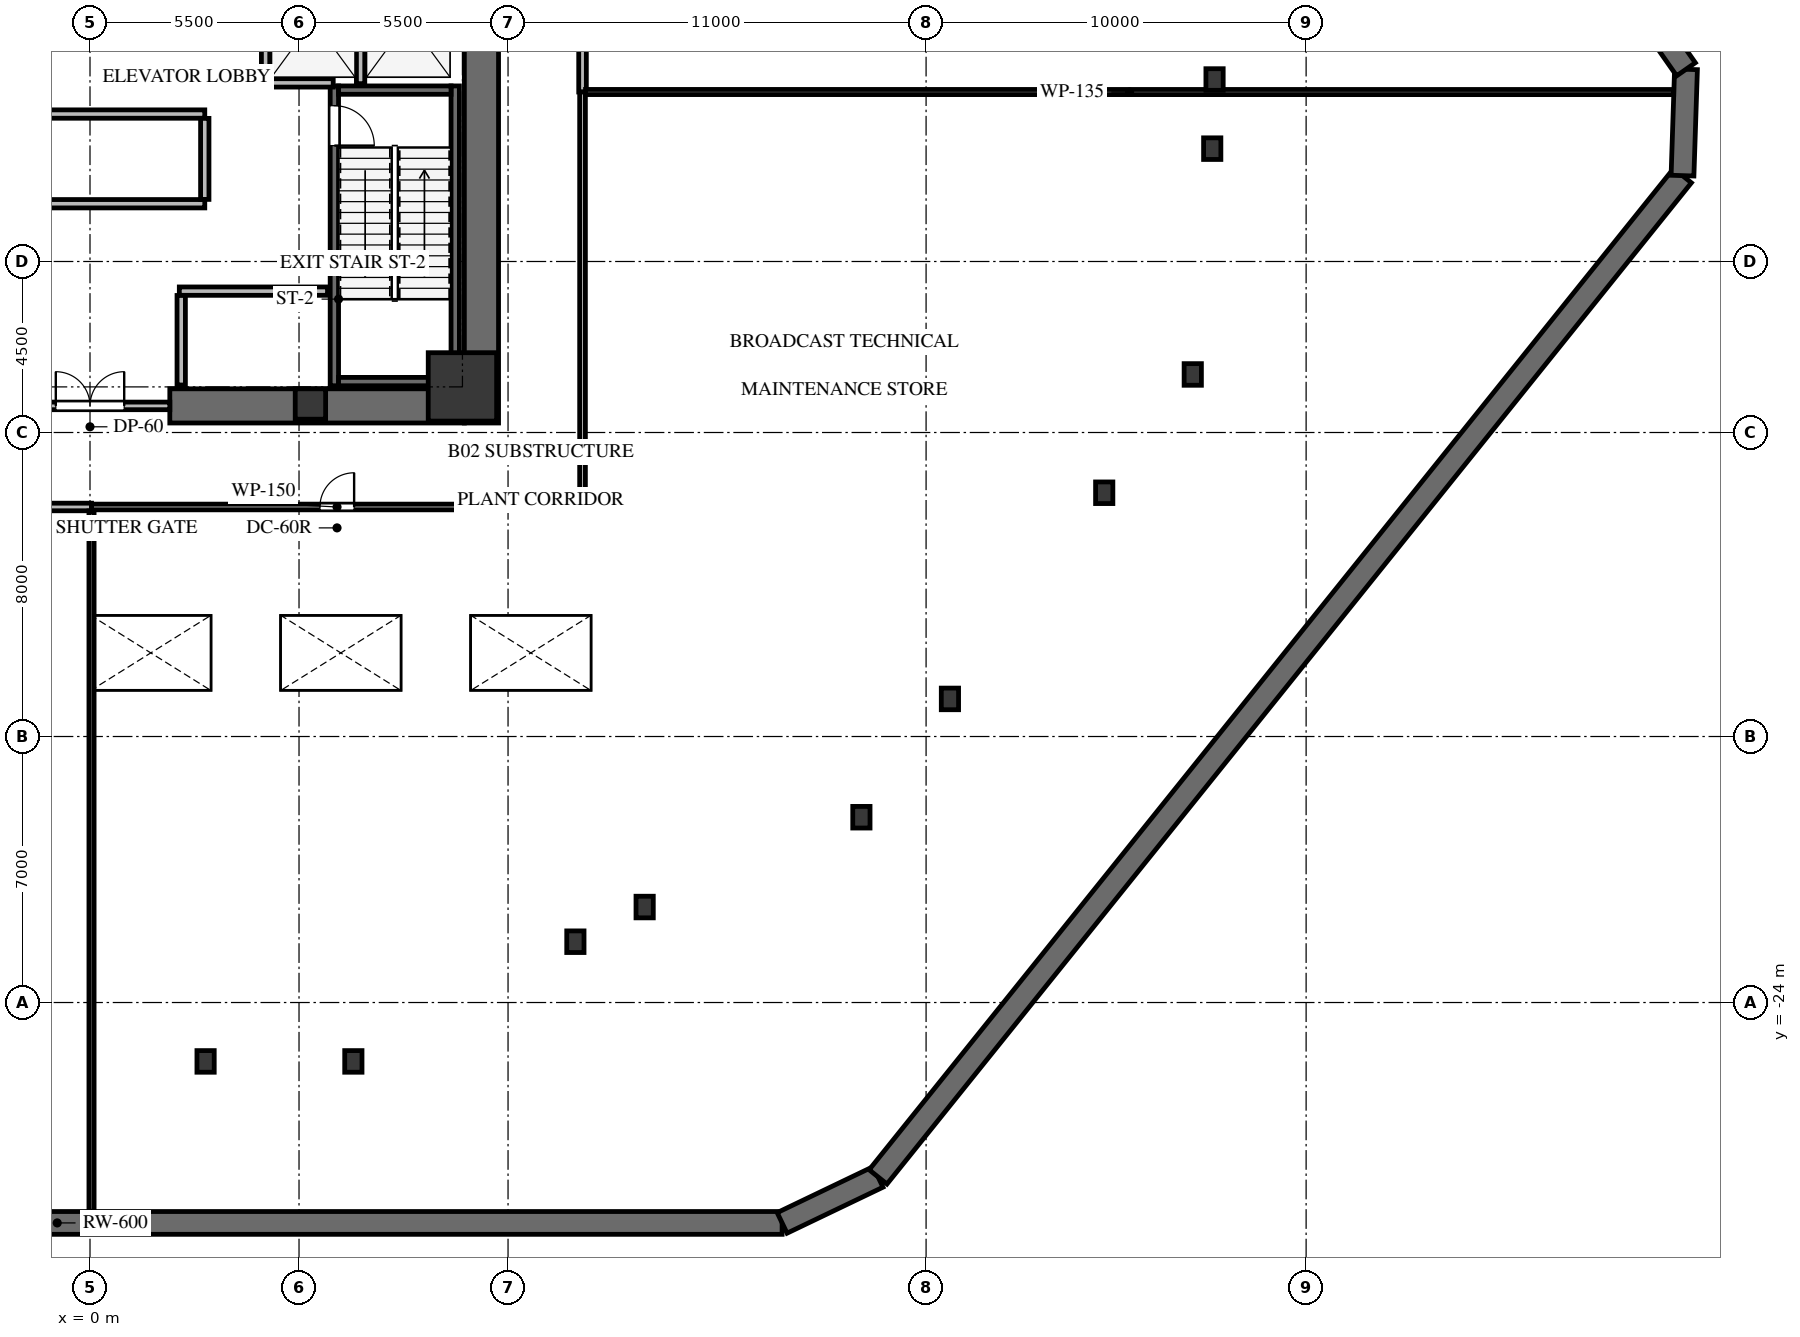
"""IFC4 building model, lengths in metres.
Left out: names, types, materials, properties, quantities, classifications, styles, units other than length and angle.
Written with IfcOpenShell. Run it as: python <this file> out.ifc"""

import sys

from ifc_helpers import new_model, si_unit, direction, frame, frame_2d, origin, origin_2d, place, context, subcontext, project, spatial, rectangle, i_section, extrude, source, transform, mapped, element, fill, save


model = new_model("IFC4")
c1 = context("Model", 3, precision=1e-05, world=origin(), true_north=direction((0.0, 1.0)))
c2 = subcontext(c1, "Body", "Model", "MODEL_VIEW")
j1 = project(units=[si_unit("LENGTHUNIT", "METRE"), si_unit("PLANEANGLEUNIT", "RADIAN")], contexts=[c1])
p1 = place(None, origin())
s1 = spatial("IfcSite", under=j1, at=p1, CompositionType="ELEMENT")
p2 = place(p1, origin())
s2 = spatial("IfcBuilding", under=s1, at=p2, CompositionType="ELEMENT")
p3 = place(p2, frame((0.0, 0.0, -10.0)))
s3 = spatial("IfcBuildingStorey", under=s2, at=p3, CompositionType="ELEMENT", Elevation=-10.0)
p4 = place(p3, frame((-19.938, -29.8, 0.0), z_axis=(0.0, 0.0, 1.0), x_axis=(1.0, 0.0, 0.0)))
e1 = element("IfcWall", 1, at=p4, inside=s3, PredefinedType="USERDEFINED", context=c2, shape_type="SweptSolid", body=[
    extrude(rectangle(XDim=38.149, YDim=0.6, at=frame_2d((19.075, 0.0))), origin(), (0.0, 0.0, 1.0), 5.0),
])
p5 = place(p3, frame((18.212, -29.8, 0.0), z_axis=(0.0, 0.0, 1.0), x_axis=(0.901732483037, 0.432294493415, 0.0)))
e2 = element("IfcWall", 2, at=p5, inside=s3, PredefinedType="USERDEFINED", context=c2, shape_type="SweptSolid", body=[
    extrude(rectangle(XDim=2.8, YDim=0.6, at=frame_2d((1.4, 0.0))), origin(), (0.0, 0.0, 1.0), 5.0),
])
p6 = place(p3, frame((20.737, -28.59, 0.0), z_axis=(0.0, 0.0, 1.0), x_axis=(0.626280274315, 0.779597984864, 0.0)))
e3 = element("IfcWall", 3, at=p6, inside=s3, PredefinedType="USERDEFINED", context=c2, shape_type="SweptSolid", body=[
    extrude(rectangle(XDim=33.798, YDim=0.6, at=frame_2d((16.899, 0.0))), origin(), (0.0, 0.0, 1.0), 5.0),
])
p7 = place(p3, frame((41.904, -2.24, 0.0), z_axis=(0.0, 0.0, 1.0), x_axis=(0.032870651185, 0.999459614137, 0.0)))
e4 = element("IfcWall", 4, at=p7, inside=s3, PredefinedType="USERDEFINED", context=c2, shape_type="SweptSolid", body=[
    extrude(rectangle(XDim=2.8, YDim=0.6, at=frame_2d((1.4, 0.0))), origin(), (0.0, 0.0, 1.0), 5.0),
])
p8 = place(p3, frame((41.996, 0.558, 0.0), z_axis=(0.0, 0.0, 1.0), x_axis=(-0.573667370151, 0.819088364234, 0.0)))
e5 = element("IfcWall", 5, at=p8, inside=s3, PredefinedType="USERDEFINED", context=c2, shape_type="SweptSolid", body=[
    extrude(rectangle(XDim=34.122, YDim=0.6, at=frame_2d((17.061, 0.0))), origin(), (0.0, 0.0, 1.0), 5.0),
])
p9 = place(p3, frame((10.3, -8.75, 0.0), z_axis=(0.0, 0.0, 1.0), x_axis=(0.0, 1.0, 0.0)))
e6 = element("IfcWall", 6, at=p9, inside=s3, PredefinedType="SHEAR", context=c2, shape_type="SweptSolid", body=[
    extrude(rectangle(XDim=17.5, YDim=0.9, at=frame_2d((8.75, 0.0))), origin(), (0.0, 0.0, 1.0), 5.0),
])
p10 = place(p3, frame((2.1, -8.3, 0.0), z_axis=(0.0, 0.0, 1.0), x_axis=(1.0, 0.0, 0.0)))
e7 = element("IfcWall", 7, at=p10, inside=s3, PredefinedType="SHEAR", context=c2, shape_type="SweptSolid", body=[
    extrude(rectangle(XDim=7.75, YDim=0.9, at=frame_2d((3.875, 0.0))), origin(), (0.0, 0.0, 1.0), 5.0),
])
p11 = place(p3, frame((9.61, -7.77, 0.0), z_axis=(0.0, 0.0, 1.0), x_axis=(0.0, 1.0, 0.0)))
e8 = element("IfcWall", 8, at=p11, inside=s3, PredefinedType="SHEAR", context=c2, shape_type="SweptSolid", body=[
    extrude(rectangle(XDim=7.89, YDim=0.22, at=frame_2d((3.945, 0.0))), origin(), (0.0, 0.0, 1.0), 4.65),
])
p12 = place(p3, frame((6.43, 0.12, 0.0), z_axis=(0.0, 0.0, 1.0), x_axis=(0.0, -1.0, 0.0)))
e9 = element("IfcWall", 9, at=p12, inside=s3, PredefinedType="SHEAR", context=c2, shape_type="SweptSolid", body=[
    extrude(rectangle(XDim=7.89, YDim=0.22, at=frame_2d((3.945, 0.0))), origin(), (0.0, 0.0, 1.0), 4.65),
])
p13 = place(p12, frame((0.52, 0.0, 0.0)))
e10 = element("IfcOpeningElement", 10, at=p13, cuts=e9, PredefinedType="OPENING", context=c2, shape_type="SweptSolid", body=[
    extrude(rectangle(XDim=1.05, YDim=2.15, at=frame_2d((0.525, 1.075))), frame((0.0, 0.12, 0.0), z_axis=(0.0, -1.0, 0.0), x_axis=(1.0, 0.0, 0.0)), (0.0, 0.0, 1.0), 0.24),
])
for number, where, z_axis, x_axis in (
    (11, (6.54, -7.66, 0.0), (0.0, 0.0, 1.0), (1.0, 0.0, 0.0)),
    (12, (9.5, 0.01, 0.0), (0.0, 0.0, 1.0), (-1.0, 0.0, 0.0)),
):
    element("IfcWall", number, at=place(p3, frame(where, z_axis=z_axis, x_axis=x_axis)), inside=s3, PredefinedType="SHEAR", context=c2, shape_type="SweptSolid", body=[
        extrude(rectangle(XDim=2.96, YDim=0.22, at=frame_2d((1.48, 0.0))), origin(), (0.0, 0.0, 1.0), 4.65),
    ])
m1 = source(origin(), c2, "Body", "SweptSolid", [
    extrude(rectangle(XDim=1.8, YDim=1.8, at=origin_2d()), origin(), (0.0, 0.0, 1.0), 4.65),
])
p14 = place(p3, frame((9.8, -7.8, 0.0), z_axis=(0.0, 0.0, 1.0), x_axis=(1.0, 0.0, 0.0)))
e13 = element("IfcColumn", 13, at=p14, inside=s3, PredefinedType="COLUMN", context=c2, shape_type="MappedRepresentation", body=[
    mapped(m1, transform((0.0, 0.0, 0.0), x_axis=(1.0, 0.0, 0.0), y_axis=(0.0, 1.0, 0.0), z_axis=(0.0, 0.0, 1.0), scale=1.0)),
])
m2 = source(origin(), c2, "Body", "SweptSolid", [
    extrude(rectangle(XDim=0.8, YDim=0.8, at=origin_2d()), origin(), (0.0, 0.0, 1.0), 4.65),
])
p15 = place(p3, frame((5.8, -8.25, 0.0), z_axis=(0.0, 0.0, 1.0), x_axis=(1.0, 0.0, 0.0)))
e14 = element("IfcColumn", 14, at=p15, inside=s3, PredefinedType="PILASTER", context=c2, shape_type="MappedRepresentation", body=[
    mapped(m2, transform((0.0, 0.0, 0.0), x_axis=(1.0, 0.0, 0.0), y_axis=(0.0, 1.0, 0.0), z_axis=(0.0, 0.0, 1.0), scale=1.0)),
])
m3 = source(origin(), c2, "Body", "SweptSolid", [
    extrude(i_section(OverallWidth=0.454, OverallDepth=0.569, WebThickness=0.078, FlangeThickness=0.125, FilletRadius=0.031, at=origin_2d()), origin(), (0.0, 0.0, 1.0), 4.65),
])
for number, where, z_axis, x_axis in (
    (15, (29.591, 0.289, 0.0), (0.0, 0.0, 1.0), (1.0, 0.0, 0.0)),
    (16, (29.529, -1.531, 0.0), (0.0, 0.0, 1.0), (1.0, 0.0, 0.0)),
    (17, (14.594, -21.488, 0.0), (0.0, 0.0, 1.0), (1.0, 0.0, 0.0)),
    (18, (12.772, -22.4, 0.0), (0.0, 0.0, 1.0), (1.0, 0.0, 0.0)),
    (19, (3.041, -25.55, 0.0), (0.0, 0.0, 1.0), (1.0, 0.0, 0.0)),
    (20, (6.93, -25.55, 0.0), (0.0, 0.0, 1.0), (1.0, 0.0, 0.0)),
    (21, (20.298, -19.124, 0.0), (0.0, 0.0, 1.0), (1.0, 0.0, 0.0)),
    (22, (22.627, -16.011, 0.0), (0.0, 0.0, 1.0), (1.0, 0.0, 0.0)),
    (23, (26.688, -10.586, 0.0), (0.0, 0.0, 1.0), (1.0, 0.0, 0.0)),
    (24, (29.017, -7.472, 0.0), (0.0, 0.0, 1.0), (1.0, 0.0, 0.0)),
):
    element("IfcColumn", number, at=place(p3, frame(where, z_axis=z_axis, x_axis=x_axis)), inside=s3, PredefinedType="COLUMN", context=c2, shape_type="MappedRepresentation", body=[
        mapped(m3, transform((0.0, 0.0, 0.0), x_axis=(1.0, 0.0, 0.0), y_axis=(0.0, 1.0, 0.0), z_axis=(0.0, 0.0, 1.0), scale=1.0)),
    ])
p16 = place(p3, frame((-2.1, -8.3, 0.0), z_axis=(0.0, 0.0, 1.0), x_axis=(1.0, 0.0, 0.0)))
e25 = element("IfcWall", 25, at=p16, inside=s3, PredefinedType="SOLIDWALL", context=c2, shape_type="SweptSolid", body=[
    extrude(rectangle(XDim=4.2, YDim=0.2, at=frame_2d((2.1, 0.0))), origin(), (0.0, 0.0, 1.0), 4.635),
])
p17 = place(p16, frame((1.2, 0.0, 0.0)))
e26 = element("IfcOpeningElement", 26, at=p17, cuts=e25, PredefinedType="OPENING", context=c2, shape_type="SweptSolid", body=[
    extrude(rectangle(XDim=1.8, YDim=2.15, at=frame_2d((0.9, 1.075))), frame((0.0, 0.11, 0.0), z_axis=(0.0, -1.0, 0.0), x_axis=(1.0, 0.0, 0.0)), (0.0, 0.0, 1.0), 0.22),
])
for number, where, z_axis, x_axis in (
    (27, (4.62, 0.18, 0.0), (0.0, 0.0, 1.0), (0.0, 1.0, 0.0)),
    (28, (7.12, 0.18, 0.0), (0.0, 0.0, 1.0), (0.0, 1.0, 0.0)),
):
    element("IfcWall", number, at=place(p3, frame(where, z_axis=z_axis, x_axis=x_axis)), inside=s3, PredefinedType="SOLIDWALL", context=c2, shape_type="SweptSolid", body=[
        extrude(rectangle(XDim=3.186, YDim=0.22, at=frame_2d((1.593, 0.0))), origin(), (0.0, 0.0, 1.0), 4.635),
    ])
p18 = place(p3, frame((4.734, 0.2, 0.0), z_axis=(0.0, 0.0, 1.0), x_axis=(1.0, 0.0, 0.0)))
e29 = element("IfcWall", 29, at=p18, inside=s3, PredefinedType="SOLIDWALL", context=c2, shape_type="SweptSolid", body=[
    extrude(rectangle(XDim=1.666, YDim=0.22, at=frame_2d((0.833, 0.0))), origin(), (0.0, 0.0, 1.0), 4.635),
])
p19 = place(p3, frame((2.35, -5.28, 0.0), z_axis=(0.0, 0.0, 1.0), x_axis=(1.0, 0.0, 0.0)))
e30 = element("IfcWall", 30, at=p19, inside=s3, PredefinedType="SOLIDWALL", context=c2, shape_type="SweptSolid", body=[
    extrude(rectangle(XDim=3.9, YDim=0.22, at=frame_2d((1.95, 0.0))), origin(), (0.0, 0.0, 1.0), 4.635),
])
p20 = place(p3, frame((2.4, -7.75, 0.0), z_axis=(0.0, 0.0, 1.0), x_axis=(0.0, 1.0, 0.0)))
e31 = element("IfcWall", 31, at=p20, inside=s3, PredefinedType="SOLIDWALL", context=c2, shape_type="SweptSolid", body=[
    extrude(rectangle(XDim=2.356, YDim=0.22, at=frame_2d((1.178, 0.0))), origin(), (0.0, 0.0, 1.0), 4.635),
])
for number, where, z_axis, x_axis in (
    (32, (-4.22, -2.98, 0.0), (0.0, 0.0, 1.0), (1.0, 0.0, 0.0)),
    (33, (-4.22, -0.62, 0.0), (0.0, 0.0, 1.0), (1.0, 0.0, 0.0)),
):
    element("IfcWall", number, at=place(p3, frame(where, z_axis=z_axis, x_axis=x_axis)), inside=s3, PredefinedType="SOLIDWALL", context=c2, shape_type="SweptSolid", body=[
        extrude(rectangle(XDim=7.24, YDim=0.22, at=frame_2d((3.62, 0.0))), origin(), (0.0, 0.0, 1.0), 4.635),
    ])
p21 = place(p3, frame((3.02, -2.866, 0.0), z_axis=(0.0, 0.0, 1.0), x_axis=(0.0, 1.0, 0.0)))
e34 = element("IfcWall", 34, at=p21, inside=s3, PredefinedType="SOLIDWALL", context=c2, shape_type="SweptSolid", body=[
    extrude(rectangle(XDim=2.132, YDim=0.22, at=frame_2d((1.066, 0.0))), origin(), (0.0, 0.0, 1.0), 4.635),
])
p22 = place(p3, frame((12.96, -0.04, 0.0), z_axis=(0.0, 0.0, 1.0), x_axis=(0.0, 1.0, 0.0)))
e35 = element("IfcWall", 35, at=p22, inside=s3, PredefinedType="SOLIDWALL", context=c2, shape_type="SweptSolid", body=[
    extrude(rectangle(XDim=10.896, YDim=0.2, at=frame_2d((5.448, 0.0))), origin(), (0.0, 0.0, 1.0), 3.629),
])
p23 = place(p3, frame((-12.96, -10.96, 0.0), z_axis=(0.0, 0.0, 1.0), x_axis=(1.0, 0.0, 0.0)))
e36 = element("IfcWall", 36, at=p23, inside=s3, PredefinedType="SOLIDWALL", context=c2, shape_type="SweptSolid", body=[
    extrude(rectangle(XDim=13.0, YDim=0.2, at=frame_2d((6.5, 0.0))), origin(), (0.0, 0.0, 1.0), 3.629),
])
p24 = place(p23, frame((6.05, 0.0, 0.0)))
e37 = element("IfcOpeningElement", 37, at=p24, cuts=e36, PredefinedType="OPENING", context=c2, shape_type="SweptSolid", body=[
    extrude(rectangle(XDim=0.9, YDim=2.05, at=frame_2d((0.45, 1.025))), frame((0.0, 0.11, 0.0), z_axis=(0.0, -1.0, 0.0), x_axis=(1.0, 0.0, 0.0)), (0.0, 0.0, 1.0), 0.22),
])
p25 = place(p23, frame((7.61, 0.0, 0.0)))
e38 = element("IfcOpeningElement", 38, at=p25, cuts=e36, PredefinedType="OPENING", context=c2, shape_type="SweptSolid", body=[
    extrude(rectangle(XDim=2.8, YDim=2.4, at=frame_2d((1.4, 1.2))), frame((0.0, 0.11, 0.0), z_axis=(0.0, -1.0, 0.0), x_axis=(1.0, 0.0, 0.0)), (0.0, 0.0, 1.0), 0.22),
])
p26 = place(p3, frame((0.04, -10.96, 0.0), z_axis=(0.0, 0.0, 1.0), x_axis=(1.0, 0.0, 0.0)))
e39 = element("IfcWall", 39, at=p26, inside=s3, PredefinedType="PARTITIONING", context=c2, shape_type="SweptSolid", body=[
    extrude(rectangle(XDim=12.92, YDim=0.15, at=frame_2d((6.46, 0.0))), origin(), (0.0, 0.0, 1.0), 3.629),
])
p27 = place(p26, frame((6.01, 0.0, 0.0)))
e40 = element("IfcOpeningElement", 40, at=p27, cuts=e39, PredefinedType="OPENING", context=c2, shape_type="SweptSolid", body=[
    extrude(rectangle(XDim=0.9, YDim=2.05, at=frame_2d((0.45, 1.025))), frame((0.0, 0.085, 0.0), z_axis=(0.0, -1.0, 0.0), x_axis=(1.0, 0.0, 0.0)), (0.0, 0.0, 1.0), 0.17),
])
p28 = place(p3, frame((12.96, -10.881, 0.0), z_axis=(0.0, 0.0, 1.0), x_axis=(0.0, 1.0, 0.0)))
e41 = element("IfcWall", 41, at=p28, inside=s3, PredefinedType="PARTITIONING", context=c2, shape_type="SweptSolid", body=[
    extrude(rectangle(XDim=10.841, YDim=0.15, at=frame_2d((5.42, 0.0))), origin(), (0.0, 0.0, 1.0), 3.629),
])
p29 = place(p3, frame((41.671, -0.041, 0.0), z_axis=(0.0, 0.0, 1.0), x_axis=(-0.999999999091, 4.2634469e-05, 0.0)))
e42 = element("IfcWall", 42, at=p29, inside=s3, PredefinedType="PARTITIONING", context=c2, shape_type="SweptSolid", body=[
    extrude(rectangle(XDim=28.632, YDim=0.135, at=frame_2d((14.316, 0.0))), origin(), (0.0, 0.0, 1.0), 3.629),
])
p30 = place(p3, frame((0.04, -11.064, 0.0), z_axis=(0.0, 0.0, 1.0), x_axis=(0.0, -1.0, 0.0)))
e43 = element("IfcWall", 43, at=p30, inside=s3, PredefinedType="PARTITIONING", context=c2, shape_type="SweptSolid", body=[
    extrude(rectangle(XDim=18.431, YDim=0.135, at=frame_2d((9.216, 0.0))), origin(), (0.0, 0.0, 1.0), 3.944),
])
m4 = source(origin(), c2, "Body", "SweptSolid", [
    extrude(rectangle(XDim=1.05, YDim=2.15, at=frame_2d((0.525, 1.075))), frame((0.0, 0.025, 0.0), z_axis=(0.0, -1.0, 0.0), x_axis=(1.0, 0.0, 0.0)), (0.0, 0.0, 1.0), 0.05),
])
p31 = place(p13, origin())
e44 = element("IfcDoor", 44, at=p31, inside=s3, OperationType="SINGLE_SWING_RIGHT", PredefinedType="DOOR", context=c2, shape_type="MappedRepresentation", body=[
    mapped(m4, transform((0.0, 0.0, 0.0), x_axis=(1.0, 0.0, 0.0), y_axis=(0.0, 1.0, 0.0), z_axis=(0.0, 0.0, 1.0), scale=1.0)),
])
fill(e10, e44)
m5 = source(origin(), c2, "Body", "SweptSolid", [
    extrude(rectangle(XDim=1.8, YDim=2.15, at=frame_2d((0.9, 1.075))), frame((0.0, 0.025, 0.0), z_axis=(0.0, -1.0, 0.0), x_axis=(1.0, 0.0, 0.0)), (0.0, 0.0, 1.0), 0.05),
])
p32 = place(p17, origin())
e45 = element("IfcDoor", 45, at=p32, inside=s3, OperationType="DOUBLE_DOOR_SINGLE_SWING", PredefinedType="DOOR", context=c2, shape_type="MappedRepresentation", body=[
    mapped(m5, transform((0.0, 0.0, 0.0), x_axis=(1.0, 0.0, 0.0), y_axis=(0.0, 1.0, 0.0), z_axis=(0.0, 0.0, 1.0), scale=1.0)),
])
fill(e26, e45)
m6 = source(origin(), c2, "Body", "SweptSolid", [
    extrude(rectangle(XDim=0.9, YDim=2.05, at=frame_2d((0.45, 1.025))), frame((0.0, 0.025, 0.0), z_axis=(0.0, -1.0, 0.0), x_axis=(1.0, 0.0, 0.0)), (0.0, 0.0, 1.0), 0.05),
])
p33 = place(p27, origin())
e46 = element("IfcDoor", 46, at=p33, inside=s3, OperationType="SINGLE_SWING_RIGHT", PredefinedType="DOOR", context=c2, shape_type="MappedRepresentation", body=[
    mapped(m6, transform((0.0, 0.0, 0.0), x_axis=(1.0, 0.0, 0.0), y_axis=(0.0, 1.0, 0.0), z_axis=(0.0, 0.0, 1.0), scale=1.0)),
])
fill(e40, e46)
save(model, sys.argv[1])
